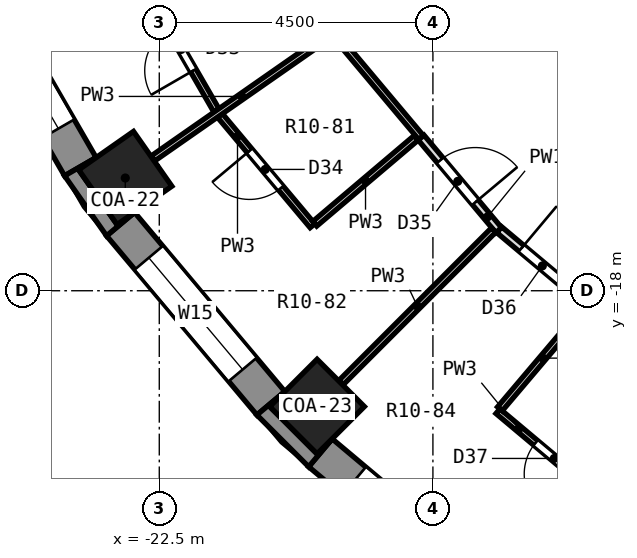
"""IFC4 building model, lengths in metres.
Left out: names, types, materials, properties, quantities, classifications, styles, units other than length and angle.
Written with IfcOpenShell. Run it as: python <this file> out.ifc"""

import sys

from ifc_helpers import new_model, si_unit, direction, frame, frame_2d, origin, origin_2d, place, context, subcontext, project, spatial, polyline, rectangle, outline, extrude, element, fill, save


model = new_model("IFC4")
c1 = context("Model", 3, precision=1e-05, world=origin(), true_north=direction((0.0, 1.0)))
c2 = subcontext(c1, "Body", "Model", "MODEL_VIEW")
j1 = project(units=[si_unit("LENGTHUNIT", "METRE"), si_unit("PLANEANGLEUNIT", "RADIAN")], contexts=[c1])
p1 = place(None, origin())
s1 = spatial("IfcSite", under=j1, at=p1, CompositionType="ELEMENT")
p2 = place(p1, origin())
s2 = spatial("IfcBuilding", under=s1, at=p2, CompositionType="ELEMENT")
p3 = place(p2, frame((0.0, 0.0, 36.2)))
s3 = spatial("IfcBuildingStorey", under=s2, at=p3, CompositionType="ELEMENT", Elevation=36.2)
for number, where, z_axis, x_axis in (
    (1, (-23.059, -16.146, 0.0), (0.0, 0.0, 1.0), (-0.819, -0.574, 0.0)),
    (2, (-19.905, -19.905, 0.0), (0.0, 0.0, 1.0), (-0.707, -0.707, 0.0)),
):
    element("IfcColumn", number, at=place(p3, frame(where, z_axis=z_axis, x_axis=x_axis)), inside=s3, PredefinedType="COLUMN", context=c2, shape_type="SweptSolid", body=[
        extrude(rectangle(XDim=1.1, YDim=1.1, at=origin_2d()), origin(), (0.0, 0.0, 1.0), 3.3),
    ])
p4 = place(p3, frame((-25.721, -12.63, 0.0), z_axis=(0.0, 0.0, 1.0), x_axis=(0.499989888488, -0.86603124159, 0.0)))
e3 = element("IfcWall", 3, at=p4, inside=s3, PredefinedType="SOLIDWALL", context=c2, shape_type="SweptSolid", body=[
    extrude(rectangle(XDim=3.846, YDim=0.6, at=frame_2d((1.923, 0.0))), origin(), (0.0, 0.0, 1.0), 2.75),
])
p5 = place(p4, frame((0.723, 0.0, 0.9)))
e4 = element("IfcOpeningElement", 4, at=p5, cuts=e3, PredefinedType="OPENING", context=c2, shape_type="SweptSolid", body=[
    extrude(rectangle(XDim=2.4, YDim=1.8, at=frame_2d((1.2, 0.9))), frame((0.0, 0.312, 0.0), z_axis=(0.0, -1.0, 0.0), x_axis=(1.0, 0.0, 0.0)), (0.0, 0.0, 1.0), 0.624),
])
p6 = place(p3, frame((-23.137, -16.904, 0.0), z_axis=(0.0, 0.0, 1.0), x_axis=(0.642809392687, -0.766026164483, 0.0)))
e5 = element("IfcWall", 5, at=p6, inside=s3, PredefinedType="SOLIDWALL", context=c2, shape_type="SweptSolid", body=[
    extrude(rectangle(XDim=3.846, YDim=0.6, at=frame_2d((1.923, 0.0))), origin(), (0.0, 0.0, 1.0), 2.75),
])
p7 = place(p6, frame((0.723, 0.0, 0.9)))
e6 = element("IfcOpeningElement", 6, at=p7, cuts=e5, PredefinedType="OPENING", context=c2, shape_type="SweptSolid", body=[
    extrude(rectangle(XDim=2.4, YDim=1.8, at=frame_2d((1.2, 0.9))), frame((0.0, 0.312, 0.0), z_axis=(0.0, -1.0, 0.0), x_axis=(1.0, 0.0, 0.0)), (0.0, 0.0, 1.0), 0.624),
])
p8 = place(p3, frame((-19.85, -20.665, 0.0), z_axis=(0.0, 0.0, 1.0), x_axis=(0.766026164483, -0.642809392687, 0.0)))
e7 = element("IfcWall", 7, at=p8, inside=s3, PredefinedType="SOLIDWALL", context=c2, shape_type="SweptSolid", body=[
    extrude(rectangle(XDim=3.846, YDim=0.6, at=frame_2d((1.923, 0.0))), origin(), (0.0, 0.0, 1.0), 2.75),
])
p9 = place(p8, frame((0.723, 0.0, 0.9)))
e8 = element("IfcOpeningElement", 8, at=p9, cuts=e7, PredefinedType="OPENING", context=c2, shape_type="SweptSolid", body=[
    extrude(rectangle(XDim=2.4, YDim=1.8, at=frame_2d((1.2, 0.9))), frame((0.0, 0.312, 0.0), z_axis=(0.0, -1.0, 0.0), x_axis=(1.0, 0.0, 0.0)), (0.0, 0.0, 1.0), 0.624),
])
p10 = place(p3, origin())
e9 = element("IfcWall", 9, at=p10, inside=s3, PredefinedType="SOLIDWALL", context=c2, shape_type="SweptSolid", body=[
    extrude(outline(polyline([(-24.058, -16.11), (-23.367, -17.097), (-22.907, -16.711), (-23.194, -16.912), (-23.825, -16.011), (-23.538, -15.81), (-24.058, -16.11)])), origin(), (0.0, 0.0, 1.0), 2.75),
])
p11 = place(p3, origin())
e10 = element("IfcWall", 10, at=p11, inside=s3, PredefinedType="SOLIDWALL", context=c2, shape_type="SweptSolid", body=[
    extrude(outline(polyline([(-20.043, -20.895), (-19.657, -20.435), (-19.905, -20.683), (-20.683, -19.905), (-20.435, -19.657), (-20.895, -20.043), (-20.043, -20.895)])), origin(), (0.0, 0.0, 1.0), 2.75),
])
p12 = place(p3, frame((-22.744, -12.985, 0.0), z_axis=(0.0, 0.0, 1.0), x_axis=(0.499987246797, -0.866032766724, 0.0)))
e11 = element("IfcWall", 11, at=p12, inside=s3, PredefinedType="PARTITIONING", context=c2, shape_type="SweptSolid", body=[
    extrude(rectangle(XDim=2.368, YDim=0.1, at=frame_2d((1.184, 0.0))), origin(), (0.0, 0.0, 1.0), 2.75),
])
p13 = place(p12, frame((0.809, 0.0, 0.0)))
e12 = element("IfcOpeningElement", 12, at=p13, cuts=e11, PredefinedType="OPENING", context=c2, shape_type="SweptSolid", body=[
    extrude(rectangle(XDim=0.8, YDim=2.1, at=frame_2d((0.4, 1.05))), frame((0.0, 0.062, 0.0), z_axis=(0.0, -1.0, 0.0), x_axis=(1.0, 0.0, 0.0)), (0.0, 0.0, 1.0), 0.124),
])
p14 = place(p3, frame((-21.503, -15.117, 0.0), z_axis=(0.0, 0.0, 1.0), x_axis=(0.642807507344, -0.766027746561, 0.0)))
e13 = element("IfcWall", 13, at=p14, inside=s3, PredefinedType="PARTITIONING", context=c2, shape_type="SweptSolid", body=[
    extrude(rectangle(XDim=2.368, YDim=0.1, at=frame_2d((1.184, 0.0))), origin(), (0.0, 0.0, 1.0), 2.75),
])
p15 = place(p14, frame((0.759, 0.0, 0.0)))
e14 = element("IfcOpeningElement", 14, at=p15, cuts=e13, PredefinedType="OPENING", context=c2, shape_type="SweptSolid", body=[
    extrude(rectangle(XDim=0.8, YDim=2.1, at=frame_2d((0.4, 1.05))), frame((0.0, 0.062, 0.0), z_axis=(0.0, -1.0, 0.0), x_axis=(1.0, 0.0, 0.0)), (0.0, 0.0, 1.0), 0.124),
])
p16 = place(p3, frame((-19.612, -13.793, 0.0), z_axis=(0.0, 0.0, 1.0), x_axis=(0.642989550085, -0.765874949637, 0.0)))
e15 = element("IfcWall", 15, at=p16, inside=s3, PredefinedType="PARTITIONING", context=c2, shape_type="SweptSolid", body=[
    extrude(rectangle(XDim=2.205, YDim=0.1, at=frame_2d((1.103, 0.0))), origin(), (0.0, 0.0, 1.0), 2.75),
])
p17 = place(p3, frame((-18.194, -15.482, 0.0), z_axis=(0.0, 0.0, 1.0), x_axis=(0.642633191675, -0.766173988698, 0.0)))
e16 = element("IfcWall", 16, at=p17, inside=s3, PredefinedType="PARTITIONING", context=c2, shape_type="SweptSolid", body=[
    extrude(rectangle(XDim=1.988, YDim=0.125, at=frame_2d((0.994, 0.0))), origin(), (0.0, 0.0, 1.0), 2.75),
])
p18 = place(p17, frame((0.487, 0.0, 0.0)))
e17 = element("IfcOpeningElement", 17, at=p18, cuts=e16, PredefinedType="OPENING", context=c2, shape_type="SweptSolid", body=[
    extrude(rectangle(XDim=0.9, YDim=2.1, at=frame_2d((0.45, 1.05))), frame((0.0, 0.074, 0.0), z_axis=(0.0, -1.0, 0.0), x_axis=(1.0, 0.0, 0.0)), (0.0, 0.0, 1.0), 0.149),
])
p19 = place(p3, frame((-16.931, -19.981, 0.0), z_axis=(0.0, 0.0, 1.0), x_axis=(0.766027746561, -0.642807507344, 0.0)))
e18 = element("IfcWall", 18, at=p19, inside=s3, PredefinedType="PARTITIONING", context=c2, shape_type="SweptSolid", body=[
    extrude(rectangle(XDim=2.368, YDim=0.1, at=frame_2d((1.184, 0.0))), origin(), (0.0, 0.0, 1.0), 2.75),
])
p20 = place(p19, frame((0.809, 0.0, 0.0)))
e19 = element("IfcOpeningElement", 19, at=p20, cuts=e18, PredefinedType="OPENING", context=c2, shape_type="SweptSolid", body=[
    extrude(rectangle(XDim=0.8, YDim=2.1, at=frame_2d((0.4, 1.05))), frame((0.0, 0.062, 0.0), z_axis=(0.0, -1.0, 0.0), x_axis=(1.0, 0.0, 0.0)), (0.0, 0.0, 1.0), 0.124),
])
p21 = place(p3, frame((-16.909, -16.997, 0.0), z_axis=(0.0, 0.0, 1.0), x_axis=(0.766154061521, -0.642656948935, 0.0)))
e20 = element("IfcWall", 20, at=p21, inside=s3, PredefinedType="PARTITIONING", context=c2, shape_type="SweptSolid", body=[
    extrude(rectangle(XDim=1.862, YDim=0.125, at=frame_2d((0.931, 0.0))), origin(), (0.0, 0.0, 1.0), 2.75),
])
p22 = place(p21, frame((0.475, 0.0, 0.0)))
e21 = element("IfcOpeningElement", 21, at=p22, cuts=e20, PredefinedType="OPENING", context=c2, shape_type="SweptSolid", body=[
    extrude(rectangle(XDim=0.9, YDim=2.1, at=frame_2d((0.45, 1.05))), frame((0.0, 0.074, 0.0), z_axis=(0.0, -1.0, 0.0), x_axis=(1.0, 0.0, 0.0)), (0.0, 0.0, 1.0), 0.149),
])
p23 = place(p3, frame((-22.602, -15.823, 0.0), z_axis=(0.0, 0.0, 1.0), x_axis=(0.820194321254, 0.57208502461, 0.0)))
e22 = element("IfcWall", 22, at=p23, inside=s3, PredefinedType="PARTITIONING", context=c2, shape_type="SweptSolid", body=[
    extrude(rectangle(XDim=3.559, YDim=0.1, at=frame_2d((1.78, 0.0))), origin(), (0.0, 0.0, 1.0), 2.75),
])
p24 = place(p3, frame((-19.943, -16.899, 0.0), z_axis=(0.0, 0.0, 1.0), x_axis=(0.762954369322, 0.646452341887, 0.0)))
e23 = element("IfcWall", 23, at=p24, inside=s3, PredefinedType="PARTITIONING", context=c2, shape_type="SweptSolid", body=[
    extrude(rectangle(XDim=2.188, YDim=0.1, at=frame_2d((1.094, 0.0))), origin(), (0.0, 0.0, 1.0), 2.75),
])
p25 = place(p3, frame((-19.509, -19.509, 0.0), z_axis=(0.0, 0.0, 1.0), x_axis=(0.707106781187, 0.707106781187, 0.0)))
e24 = element("IfcWall", 24, at=p25, inside=s3, PredefinedType="PARTITIONING", context=c2, shape_type="SweptSolid", body=[
    extrude(rectangle(XDim=3.547, YDim=0.1, at=frame_2d((1.773, 0.0))), origin(), (0.0, 0.0, 1.0), 2.75),
])
p26 = place(p3, frame((-16.899, -19.943, 0.0), z_axis=(0.0, 0.0, 1.0), x_axis=(0.646452341887, 0.762954369322, 0.0)))
e25 = element("IfcWall", 25, at=p26, inside=s3, PredefinedType="PARTITIONING", context=c2, shape_type="SweptSolid", body=[
    extrude(rectangle(XDim=2.188, YDim=0.1, at=frame_2d((1.094, 0.0))), origin(), (0.0, 0.0, 1.0), 2.75),
])
p27 = place(p5, origin())
e26 = element("IfcWindow", 26, at=p27, inside=s3, PartitioningType="SINGLE_PANEL", PredefinedType="WINDOW", context=c2, shape_type="SweptSolid", body=[
    extrude(rectangle(XDim=2.4, YDim=1.8, at=frame_2d((1.2, 0.9))), frame((0.0, 0.18, 0.0), z_axis=(0.0, -1.0, 0.0), x_axis=(1.0, 0.0, 0.0)), (0.0, 0.0, 1.0), 0.06),
])
fill(e4, e26)
p28 = place(p7, origin())
e27 = element("IfcWindow", 27, at=p28, inside=s3, PartitioningType="SINGLE_PANEL", PredefinedType="WINDOW", context=c2, shape_type="SweptSolid", body=[
    extrude(rectangle(XDim=2.4, YDim=1.8, at=frame_2d((1.2, 0.9))), frame((0.0, 0.18, 0.0), z_axis=(0.0, -1.0, 0.0), x_axis=(1.0, 0.0, 0.0)), (0.0, 0.0, 1.0), 0.06),
])
fill(e6, e27)
p29 = place(p9, origin())
e28 = element("IfcWindow", 28, at=p29, inside=s3, PartitioningType="SINGLE_PANEL", PredefinedType="WINDOW", context=c2, shape_type="SweptSolid", body=[
    extrude(rectangle(XDim=2.4, YDim=1.8, at=frame_2d((1.2, 0.9))), frame((0.0, 0.18, 0.0), z_axis=(0.0, -1.0, 0.0), x_axis=(1.0, 0.0, 0.0)), (0.0, 0.0, 1.0), 0.06),
])
fill(e8, e28)
p30 = place(p13, frame((0.8, 0.0, 0.0), z_axis=(0.0, 0.0, 1.0), x_axis=(-1.0, 0.0, 0.0)))
e29 = element("IfcDoor", 29, at=p30, inside=s3, OperationType="SINGLE_SWING_LEFT", PredefinedType="DOOR", context=c2, shape_type="SweptSolid", body=[
    extrude(rectangle(XDim=0.8, YDim=2.1, at=frame_2d((0.4, 1.05))), frame((0.0, 0.025, 0.0), z_axis=(0.0, -1.0, 0.0), x_axis=(1.0, 0.0, 0.0)), (0.0, 0.0, 1.0), 0.05),
])
fill(e12, e29)
p31 = place(p15, frame((0.8, 0.0, 0.0), z_axis=(0.0, 0.0, 1.0), x_axis=(-1.0, 0.0, 0.0)))
e30 = element("IfcDoor", 30, at=p31, inside=s3, OperationType="SINGLE_SWING_RIGHT", PredefinedType="DOOR", context=c2, shape_type="SweptSolid", body=[
    extrude(rectangle(XDim=0.8, YDim=2.1, at=frame_2d((0.4, 1.05))), frame((0.0, 0.025, 0.0), z_axis=(0.0, -1.0, 0.0), x_axis=(1.0, 0.0, 0.0)), (0.0, 0.0, 1.0), 0.05),
])
fill(e14, e30)
p32 = place(p18, origin())
e31 = element("IfcDoor", 31, at=p32, inside=s3, OperationType="SINGLE_SWING_RIGHT", PredefinedType="DOOR", context=c2, shape_type="SweptSolid", body=[
    extrude(rectangle(XDim=0.9, YDim=2.1, at=frame_2d((0.45, 1.05))), frame((0.0, 0.025, 0.0), z_axis=(0.0, -1.0, 0.0), x_axis=(1.0, 0.0, 0.0)), (0.0, 0.0, 1.0), 0.05),
])
fill(e17, e31)
p33 = place(p22, origin())
e32 = element("IfcDoor", 32, at=p33, inside=s3, OperationType="SINGLE_SWING_LEFT", PredefinedType="DOOR", context=c2, shape_type="SweptSolid", body=[
    extrude(rectangle(XDim=0.9, YDim=2.1, at=frame_2d((0.45, 1.05))), frame((0.0, 0.025, 0.0), z_axis=(0.0, -1.0, 0.0), x_axis=(1.0, 0.0, 0.0)), (0.0, 0.0, 1.0), 0.05),
])
fill(e21, e32)
p34 = place(p20, frame((0.8, 0.0, 0.0), z_axis=(0.0, 0.0, 1.0), x_axis=(-1.0, 0.0, 0.0)))
e33 = element("IfcDoor", 33, at=p34, inside=s3, OperationType="SINGLE_SWING_LEFT", PredefinedType="DOOR", context=c2, shape_type="SweptSolid", body=[
    extrude(rectangle(XDim=0.8, YDim=2.1, at=frame_2d((0.4, 1.05))), frame((0.0, 0.025, 0.0), z_axis=(0.0, -1.0, 0.0), x_axis=(1.0, 0.0, 0.0)), (0.0, 0.0, 1.0), 0.05),
])
fill(e19, e33)
save(model, sys.argv[1])
